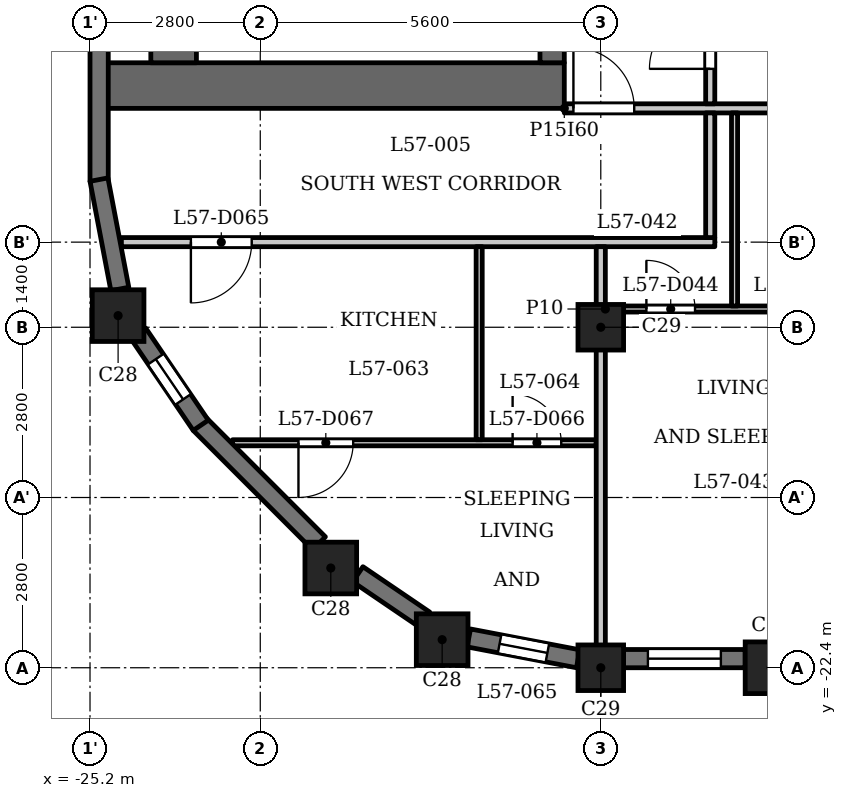
"""IFC4 building model, lengths in metres.
Left out: names, types, materials, properties, quantities, classifications, styles, units other than length and angle.
Written with IfcOpenShell. Run it as: python <this file> out.ifc"""

import sys

from ifc_helpers import new_model, si_unit, direction, frame, frame_2d, origin, origin_2d, place, context, subcontext, project, spatial, rectangle, extrude, element, fill, save


model = new_model("IFC4")
c1 = context("Model", 3, precision=1e-05, world=origin(), true_north=direction((0.0, 1.0)))
c2 = subcontext(c1, "Body", "Model", "MODEL_VIEW")
j1 = project(units=[si_unit("LENGTHUNIT", "METRE"), si_unit("PLANEANGLEUNIT", "RADIAN")], contexts=[c1])
p1 = place(None, origin())
s1 = spatial("IfcSite", under=j1, at=p1, CompositionType="ELEMENT")
p2 = place(p1, origin())
s2 = spatial("IfcBuilding", under=s1, at=p2, CompositionType="ELEMENT")
p3 = place(p2, frame((0.0, 0.0, 220.4)))
s3 = spatial("IfcBuildingStorey", under=s2, at=p3, CompositionType="ELEMENT", Elevation=220.4)
for number, where, z_axis, x_axis in (
    (1, (-19.409, -21.938, 0.0), (0.0, 0.0, 1.0), (1.0, 0.0, 0.0)),
    (2, (-14.0, -22.4, 0.0), (0.0, 0.0, 1.0), (1.0, 0.0, 0.0)),
    (3, (-24.738, -16.609, 0.0), (0.0, 0.0, 1.0), (1.0, 0.0, 0.0)),
    (4, (-21.24, -20.76, 0.0), (0.0, 0.0, 1.0), (1.0, 0.0, 0.0)),
):
    element("IfcColumn", number, at=place(p3, frame(where, z_axis=z_axis, x_axis=x_axis)), inside=s3, PredefinedType="COLUMN", context=c2, shape_type="SweptSolid", body=[
        extrude(rectangle(XDim=0.85, YDim=0.85, at=origin_2d()), origin(), (0.0, 0.0, 1.0), 3.5),
    ])
for number, where, z_axis, x_axis in (
    (5, (-16.8, -22.4, 0.0), (0.0, 0.0, 1.0), (1.0, 0.0, 0.0)),
    (6, (-16.8, -16.8, 0.0), (0.0, 0.0, 1.0), (1.0, 0.0, 0.0)),
):
    element("IfcColumn", number, at=place(p3, frame(where, z_axis=z_axis, x_axis=x_axis)), inside=s3, PredefinedType="COLUMN", context=c2, shape_type="SweptSolid", body=[
        extrude(rectangle(XDim=0.75, YDim=0.75, at=origin_2d()), origin(), (0.0, 0.0, 1.0), 3.5),
    ])
p4 = place(p3, frame((-23.397, -18.391, 0.0), z_axis=(0.0, 0.0, 1.0), x_axis=(0.707106781187, -0.707106781187, 0.0)))
e7 = element("IfcWall", 7, at=p4, inside=s3, PredefinedType="SOLIDWALL", context=c2, shape_type="SweptSolid", body=[
    extrude(rectangle(XDim=2.775, YDim=0.3, at=frame_2d((1.388, 0.0))), origin(), (0.0, 0.0, 1.0), 2.5),
])
p5 = place(p3, frame((-20.796, -20.862, 0.0), z_axis=(0.0, 0.0, 1.0), x_axis=(0.827035970432, -0.562149004813, 0.0)))
e8 = element("IfcWall", 8, at=p5, inside=s3, PredefinedType="SOLIDWALL", context=c2, shape_type="SweptSolid", body=[
    extrude(rectangle(XDim=1.327, YDim=0.3, at=frame_2d((0.664, 0.0))), origin(), (0.0, 0.0, 1.0), 2.5),
])
p6 = place(p3, frame((-18.971, -21.91, 0.0), z_axis=(0.0, 0.0, 1.0), x_axis=(0.982300037503, -0.187314271538, 0.0)))
e9 = element("IfcWall", 9, at=p6, inside=s3, PredefinedType="SOLIDWALL", context=c2, shape_type="SweptSolid", body=[
    extrude(rectangle(XDim=1.831, YDim=0.3, at=frame_2d((0.916, 0.0))), origin(), (0.0, 0.0, 1.0), 2.5),
])
p7 = place(p6, frame((0.516, 0.0, 0.6)))
e10 = element("IfcOpeningElement", 10, at=p7, cuts=e9, PredefinedType="OPENING", context=c2, shape_type="SweptSolid", body=[
    extrude(rectangle(XDim=0.8, YDim=1.55, at=frame_2d((0.4, 0.775))), frame((0.0, 0.16, 0.0), z_axis=(0.0, -1.0, 0.0), x_axis=(1.0, 0.0, 0.0)), (0.0, 0.0, 1.0), 0.32),
])
p8 = place(p3, frame((-16.425, -22.25, 0.0), z_axis=(0.0, 0.0, 1.0), x_axis=(1.0, 0.0, 0.0)))
e11 = element("IfcWall", 11, at=p8, inside=s3, PredefinedType="SOLIDWALL", context=c2, shape_type="SweptSolid", body=[
    extrude(rectangle(XDim=2.0, YDim=0.3, at=frame_2d((1.0, 0.0))), origin(), (0.0, 0.0, 1.0), 2.5),
])
p9 = place(p8, frame((0.4, 0.0, 0.6)))
e12 = element("IfcOpeningElement", 12, at=p9, cuts=e11, PredefinedType="OPENING", context=c2, shape_type="SweptSolid", body=[
    extrude(rectangle(XDim=1.2, YDim=1.55, at=frame_2d((0.6, 0.775))), frame((0.0, 0.16, 0.0), z_axis=(0.0, -1.0, 0.0), x_axis=(1.0, 0.0, 0.0)), (0.0, 0.0, 1.0), 0.32),
])
p10 = place(p3, frame((-25.05, -11.625, 0.0), z_axis=(0.0, 0.0, 1.0), x_axis=(0.0, -1.0, 0.0)))
e13 = element("IfcWall", 13, at=p10, inside=s3, PredefinedType="SOLIDWALL", context=c2, shape_type="SweptSolid", body=[
    extrude(rectangle(XDim=2.775, YDim=0.3, at=frame_2d((1.387, 0.0))), origin(), (0.0, 0.0, 1.0), 2.5),
])
p11 = place(p3, frame((-25.053, -14.372, 0.0), z_axis=(0.0, 0.0, 1.0), x_axis=(0.187442908742, -0.982275499014, 0.0)))
e14 = element("IfcWall", 14, at=p11, inside=s3, PredefinedType="SOLIDWALL", context=c2, shape_type="SweptSolid", body=[
    extrude(rectangle(XDim=1.831, YDim=0.3, at=frame_2d((0.916, 0.0))), origin(), (0.0, 0.0, 1.0), 2.5),
])
p12 = place(p3, frame((-24.408, -16.898, 0.0), z_axis=(0.0, 0.0, 1.0), x_axis=(0.562062033417, -0.827095079535, 0.0)))
e15 = element("IfcWall", 15, at=p12, inside=s3, PredefinedType="SOLIDWALL", context=c2, shape_type="SweptSolid", body=[
    extrude(rectangle(XDim=1.831, YDim=0.3, at=frame_2d((0.916, 0.0))), origin(), (0.0, 0.0, 1.0), 2.5),
])
p13 = place(p12, frame((0.516, 0.0, 0.6)))
e16 = element("IfcOpeningElement", 16, at=p13, cuts=e15, PredefinedType="OPENING", context=c2, shape_type="SweptSolid", body=[
    extrude(rectangle(XDim=0.8, YDim=1.55, at=frame_2d((0.4, 0.775))), frame((0.0, 0.16, 0.0), z_axis=(0.0, -1.0, 0.0), x_axis=(1.0, 0.0, 0.0)), (0.0, 0.0, 1.0), 0.32),
])
p14 = place(p3, frame((-17.4, -12.825, 0.0), z_axis=(0.0, 0.0, 1.0), x_axis=(-1.0, 0.0, 0.0)))
e17 = element("IfcWall", 17, at=p14, inside=s3, PredefinedType="SHEAR", context=c2, shape_type="SweptSolid", body=[
    extrude(rectangle(XDim=7.6, YDim=0.75, at=frame_2d((3.8, 0.0))), origin(), (0.0, 0.0, 1.0), 3.2),
])
p15 = place(p3, frame((-17.6, -12.45, 0.0), z_axis=(0.0, 0.0, 1.0), x_axis=(0.0, 1.0, 0.0)))
e18 = element("IfcWall", 18, at=p15, inside=s3, PredefinedType="SHEAR", context=c2, shape_type="SweptSolid", body=[
    extrude(rectangle(XDim=24.9, YDim=0.4, at=frame_2d((12.45, 0.0))), origin(), (0.0, 0.0, 1.0), 3.2),
])
p16 = place(p15, frame((6.85, 0.0, 0.0)))
e19 = element("IfcOpeningElement", 19, at=p16, cuts=e18, PredefinedType="OPENING", context=c2, shape_type="SweptSolid", body=[
    extrude(rectangle(XDim=0.9, YDim=2.1, at=frame_2d((0.45, 1.05))), frame((0.0, 0.21, 0.0), z_axis=(0.0, -1.0, 0.0), x_axis=(1.0, 0.0, 0.0)), (0.0, 0.0, 1.0), 0.42),
])
p17 = place(p15, frame((10.45, 0.0, 0.0)))
e20 = element("IfcOpeningElement", 20, at=p17, cuts=e18, PredefinedType="OPENING", context=c2, shape_type="SweptSolid", body=[
    extrude(rectangle(XDim=0.9, YDim=2.1, at=frame_2d((0.45, 1.05))), frame((0.0, 0.21, 0.0), z_axis=(0.0, -1.0, 0.0), x_axis=(1.0, 0.0, 0.0)), (0.0, 0.0, 1.0), 0.42),
])
p18 = place(p15, frame((15.6, 0.0, 0.0)))
e21 = element("IfcOpeningElement", 21, at=p18, cuts=e18, PredefinedType="OPENING", context=c2, shape_type="SweptSolid", body=[
    extrude(rectangle(XDim=1.1, YDim=2.1, at=frame_2d((0.55, 1.05))), frame((0.0, 0.21, 0.0), z_axis=(0.0, -1.0, 0.0), x_axis=(1.0, 0.0, 0.0)), (0.0, 0.0, 1.0), 0.42),
])
p19 = place(p15, frame((18.0, 0.0, 0.0)))
e22 = element("IfcOpeningElement", 22, at=p19, cuts=e18, PredefinedType="OPENING", context=c2, shape_type="SweptSolid", body=[
    extrude(rectangle(XDim=1.1, YDim=2.1, at=frame_2d((0.55, 1.05))), frame((0.0, 0.21, 0.0), z_axis=(0.0, -1.0, 0.0), x_axis=(1.0, 0.0, 0.0)), (0.0, 0.0, 1.0), 0.42),
])
p20 = place(p15, frame((23.025, 0.0, 0.0)))
e23 = element("IfcOpeningElement", 23, at=p20, cuts=e18, PredefinedType="OPENING", context=c2, shape_type="SweptSolid", body=[
    extrude(rectangle(XDim=1.1, YDim=2.1, at=frame_2d((0.55, 1.05))), frame((0.0, 0.21, 0.0), z_axis=(0.0, -1.0, 0.0), x_axis=(1.0, 0.0, 0.0)), (0.0, 0.0, 1.0), 0.42),
])
p21 = place(p15, frame((0.775, 0.0, 0.0)))
e24 = element("IfcOpeningElement", 24, at=p21, cuts=e18, PredefinedType="OPENING", context=c2, shape_type="SweptSolid", body=[
    extrude(rectangle(XDim=1.1, YDim=2.1, at=frame_2d((0.55, 1.05))), frame((0.0, 0.21, 0.0), z_axis=(0.0, -1.0, 0.0), x_axis=(1.0, 0.0, 0.0)), (0.0, 0.0, 1.0), 0.42),
])
p22 = place(p15, frame((12.925, 0.0, 0.0)))
e25 = element("IfcOpeningElement", 25, at=p22, cuts=e18, PredefinedType="OPENING", context=c2, shape_type="SweptSolid", body=[
    extrude(rectangle(XDim=1.8, YDim=2.1, at=frame_2d((0.9, 1.05))), frame((0.0, 0.21, 0.0), z_axis=(0.0, -1.0, 0.0), x_axis=(1.0, 0.0, 0.0)), (0.0, 0.0, 1.0), 0.42),
])
p23 = place(p3, frame((-23.825, -12.45, 0.0), z_axis=(0.0, 0.0, 1.0), x_axis=(0.0, 1.0, 0.0)))
e26 = element("IfcWall", 26, at=p23, inside=s3, PredefinedType="SHEAR", context=c2, shape_type="SweptSolid", body=[
    extrude(rectangle(XDim=24.9, YDim=0.75, at=frame_2d((12.45, 0.0))), origin(), (0.0, 0.0, 1.0), 3.2),
])
p24 = place(p3, frame((-22.856, -18.7, 0.0), z_axis=(0.0, 0.0, 1.0), x_axis=(1.0, 0.0, 0.0)))
e27 = element("IfcWall", 27, at=p24, inside=s3, PredefinedType="PARTITIONING", context=c2, shape_type="SweptSolid", body=[
    extrude(rectangle(XDim=5.981, YDim=0.1, at=frame_2d((2.99, 0.0))), origin(), (0.0, 0.0, 1.0), 3.2),
])
p25 = place(p24, frame((4.606, 0.0, 0.0)))
e28 = element("IfcOpeningElement", 28, at=p25, cuts=e27, PredefinedType="OPENING", context=c2, shape_type="SweptSolid", body=[
    extrude(rectangle(XDim=0.8, YDim=2.1, at=frame_2d((0.4, 1.05))), frame((0.0, 0.06, 0.0), z_axis=(0.0, -1.0, 0.0), x_axis=(1.0, 0.0, 0.0)), (0.0, 0.0, 1.0), 0.12),
])
p26 = place(p24, frame((1.084, 0.0, 0.0)))
e29 = element("IfcOpeningElement", 29, at=p26, cuts=e27, PredefinedType="OPENING", context=c2, shape_type="SweptSolid", body=[
    extrude(rectangle(XDim=0.9, YDim=2.1, at=frame_2d((0.45, 1.05))), frame((0.0, 0.06, 0.0), z_axis=(0.0, -1.0, 0.0), x_axis=(1.0, 0.0, 0.0)), (0.0, 0.0, 1.0), 0.12),
])
p27 = place(p3, frame((-16.725, -16.5, 0.0), z_axis=(0.0, 0.0, 1.0), x_axis=(1.0, 0.0, 0.0)))
e30 = element("IfcWall", 30, at=p27, inside=s3, PredefinedType="PARTITIONING", context=c2, shape_type="SweptSolid", body=[
    extrude(rectangle(XDim=33.45, YDim=0.1, at=frame_2d((16.725, 0.0))), origin(), (0.0, 0.0, 1.0), 3.2),
])
p28 = place(p27, frame((0.675, 0.0, 0.0)))
e31 = element("IfcOpeningElement", 31, at=p28, cuts=e30, PredefinedType="OPENING", context=c2, shape_type="SweptSolid", body=[
    extrude(rectangle(XDim=0.8, YDim=2.1, at=frame_2d((0.4, 1.05))), frame((0.0, 0.06, 0.0), z_axis=(0.0, -1.0, 0.0), x_axis=(1.0, 0.0, 0.0)), (0.0, 0.0, 1.0), 0.12),
])
p29 = place(p27, frame((2.775, 0.0, 0.0)))
e32 = element("IfcOpeningElement", 32, at=p29, cuts=e30, PredefinedType="OPENING", context=c2, shape_type="SweptSolid", body=[
    extrude(rectangle(XDim=0.9, YDim=2.1, at=frame_2d((0.45, 1.05))), frame((0.0, 0.06, 0.0), z_axis=(0.0, -1.0, 0.0), x_axis=(1.0, 0.0, 0.0)), (0.0, 0.0, 1.0), 0.12),
])
p30 = place(p27, frame((6.425, 0.0, 0.0)))
e33 = element("IfcOpeningElement", 33, at=p30, cuts=e30, PredefinedType="OPENING", context=c2, shape_type="SweptSolid", body=[
    extrude(rectangle(XDim=0.8, YDim=2.1, at=frame_2d((0.4, 1.05))), frame((0.0, 0.06, 0.0), z_axis=(0.0, -1.0, 0.0), x_axis=(1.0, 0.0, 0.0)), (0.0, 0.0, 1.0), 0.12),
])
p31 = place(p27, frame((8.775, 0.0, 0.0)))
e34 = element("IfcOpeningElement", 34, at=p31, cuts=e30, PredefinedType="OPENING", context=c2, shape_type="SweptSolid", body=[
    extrude(rectangle(XDim=0.9, YDim=2.1, at=frame_2d((0.45, 1.05))), frame((0.0, 0.06, 0.0), z_axis=(0.0, -1.0, 0.0), x_axis=(1.0, 0.0, 0.0)), (0.0, 0.0, 1.0), 0.12),
])
p32 = place(p27, frame((12.525, 0.0, 0.0)))
e35 = element("IfcOpeningElement", 35, at=p32, cuts=e30, PredefinedType="OPENING", context=c2, shape_type="SweptSolid", body=[
    extrude(rectangle(XDim=0.9, YDim=2.1, at=frame_2d((0.45, 1.05))), frame((0.0, 0.06, 0.0), z_axis=(0.0, -1.0, 0.0), x_axis=(1.0, 0.0, 0.0)), (0.0, 0.0, 1.0), 0.12),
])
p33 = place(p27, frame((14.775, 0.0, 0.0)))
e36 = element("IfcOpeningElement", 36, at=p33, cuts=e30, PredefinedType="OPENING", context=c2, shape_type="SweptSolid", body=[
    extrude(rectangle(XDim=0.9, YDim=2.1, at=frame_2d((0.45, 1.05))), frame((0.0, 0.06, 0.0), z_axis=(0.0, -1.0, 0.0), x_axis=(1.0, 0.0, 0.0)), (0.0, 0.0, 1.0), 0.12),
])
p34 = place(p27, frame((25.475, 0.0, 0.0)))
e37 = element("IfcOpeningElement", 37, at=p34, cuts=e30, PredefinedType="OPENING", context=c2, shape_type="SweptSolid", body=[
    extrude(rectangle(XDim=0.8, YDim=2.1, at=frame_2d((0.4, 1.05))), frame((0.0, 0.06, 0.0), z_axis=(0.0, -1.0, 0.0), x_axis=(1.0, 0.0, 0.0)), (0.0, 0.0, 1.0), 0.12),
])
p35 = place(p27, frame((23.225, 0.0, 0.0)))
e38 = element("IfcOpeningElement", 38, at=p35, cuts=e30, PredefinedType="OPENING", context=c2, shape_type="SweptSolid", body=[
    extrude(rectangle(XDim=0.9, YDim=2.1, at=frame_2d((0.45, 1.05))), frame((0.0, 0.06, 0.0), z_axis=(0.0, -1.0, 0.0), x_axis=(1.0, 0.0, 0.0)), (0.0, 0.0, 1.0), 0.12),
])
p36 = place(p27, frame((17.875, 0.0, 0.0)))
e39 = element("IfcOpeningElement", 39, at=p36, cuts=e30, PredefinedType="OPENING", context=c2, shape_type="SweptSolid", body=[
    extrude(rectangle(XDim=0.9, YDim=2.1, at=frame_2d((0.45, 1.05))), frame((0.0, 0.06, 0.0), z_axis=(0.0, -1.0, 0.0), x_axis=(1.0, 0.0, 0.0)), (0.0, 0.0, 1.0), 0.12),
])
p37 = place(p27, frame((19.975, 0.0, 0.0)))
e40 = element("IfcOpeningElement", 40, at=p37, cuts=e30, PredefinedType="OPENING", context=c2, shape_type="SweptSolid", body=[
    extrude(rectangle(XDim=0.9, YDim=2.1, at=frame_2d((0.45, 1.05))), frame((0.0, 0.06, 0.0), z_axis=(0.0, -1.0, 0.0), x_axis=(1.0, 0.0, 0.0)), (0.0, 0.0, 1.0), 0.12),
])
p38 = place(p27, frame((30.825, 0.0, 0.0)))
e41 = element("IfcOpeningElement", 41, at=p38, cuts=e30, PredefinedType="OPENING", context=c2, shape_type="SweptSolid", body=[
    extrude(rectangle(XDim=0.8, YDim=2.1, at=frame_2d((0.4, 1.05))), frame((0.0, 0.06, 0.0), z_axis=(0.0, -1.0, 0.0), x_axis=(1.0, 0.0, 0.0)), (0.0, 0.0, 1.0), 0.12),
])
p39 = place(p27, frame((29.075, 0.0, 0.0)))
e42 = element("IfcOpeningElement", 42, at=p39, cuts=e30, PredefinedType="OPENING", context=c2, shape_type="SweptSolid", body=[
    extrude(rectangle(XDim=0.9, YDim=2.1, at=frame_2d((0.45, 1.05))), frame((0.0, 0.06, 0.0), z_axis=(0.0, -1.0, 0.0), x_axis=(1.0, 0.0, 0.0)), (0.0, 0.0, 1.0), 0.12),
])
p40 = place(p3, frame((-24.684, -15.4, 0.0), z_axis=(0.0, 0.0, 1.0), x_axis=(1.0, 0.0, 0.0)))
e43 = element("IfcWall", 43, at=p40, inside=s3, PredefinedType="PARTITIONING", context=c2, shape_type="SweptSolid", body=[
    extrude(rectangle(XDim=9.759, YDim=0.15, at=frame_2d((4.879, 0.0))), origin(), (0.0, 0.0, 1.0), 3.2),
])
p41 = place(p40, frame((1.143, 0.0, 0.0)))
e44 = element("IfcOpeningElement", 44, at=p41, cuts=e43, PredefinedType="OPENING", context=c2, shape_type="SweptSolid", body=[
    extrude(rectangle(XDim=1.0, YDim=2.1, at=frame_2d((0.5, 1.05))), frame((0.0, 0.085, 0.0), z_axis=(0.0, -1.0, 0.0), x_axis=(1.0, 0.0, 0.0)), (0.0, 0.0, 1.0), 0.17),
])
p42 = place(p3, frame((-17.4, -13.2, 0.0), z_axis=(0.0, 0.0, 1.0), x_axis=(1.0, 0.0, 0.0)))
e45 = element("IfcWall", 45, at=p42, inside=s3, PredefinedType="PARTITIONING", context=c2, shape_type="SweptSolid", body=[
    extrude(rectangle(XDim=34.8, YDim=0.15, at=frame_2d((17.4, 0.0))), origin(), (0.0, 0.0, 1.0), 3.2),
])
p43 = place(p42, frame((0.15, 0.0, 0.0)))
e46 = element("IfcOpeningElement", 46, at=p43, cuts=e45, PredefinedType="OPENING", context=c2, shape_type="SweptSolid", body=[
    extrude(rectangle(XDim=1.0, YDim=2.1, at=frame_2d((0.5, 1.05))), frame((0.0, 0.085, 0.0), z_axis=(0.0, -1.0, 0.0), x_axis=(1.0, 0.0, 0.0)), (0.0, 0.0, 1.0), 0.17),
])
p44 = place(p42, frame((33.55, 0.0, 0.0)))
e47 = element("IfcOpeningElement", 47, at=p44, cuts=e45, PredefinedType="OPENING", context=c2, shape_type="SweptSolid", body=[
    extrude(rectangle(XDim=1.0, YDim=2.1, at=frame_2d((0.5, 1.05))), frame((0.0, 0.085, 0.0), z_axis=(0.0, -1.0, 0.0), x_axis=(1.0, 0.0, 0.0)), (0.0, 0.0, 1.0), 0.17),
])
p45 = place(p42, frame((3.7, 0.0, 0.0)))
e48 = element("IfcOpeningElement", 48, at=p45, cuts=e45, PredefinedType="OPENING", context=c2, shape_type="SweptSolid", body=[
    extrude(rectangle(XDim=1.0, YDim=2.1, at=frame_2d((0.5, 1.05))), frame((0.0, 0.085, 0.0), z_axis=(0.0, -1.0, 0.0), x_axis=(1.0, 0.0, 0.0)), (0.0, 0.0, 1.0), 0.17),
])
p46 = place(p42, frame((15.7, 0.0, 0.0)))
e49 = element("IfcOpeningElement", 49, at=p46, cuts=e45, PredefinedType="OPENING", context=c2, shape_type="SweptSolid", body=[
    extrude(rectangle(XDim=1.0, YDim=2.1, at=frame_2d((0.5, 1.05))), frame((0.0, 0.085, 0.0), z_axis=(0.0, -1.0, 0.0), x_axis=(1.0, 0.0, 0.0)), (0.0, 0.0, 1.0), 0.17),
])
p47 = place(p42, frame((21.3, 0.0, 0.0)))
e50 = element("IfcOpeningElement", 50, at=p47, cuts=e45, PredefinedType="OPENING", context=c2, shape_type="SweptSolid", body=[
    extrude(rectangle(XDim=1.0, YDim=2.1, at=frame_2d((0.5, 1.05))), frame((0.0, 0.085, 0.0), z_axis=(0.0, -1.0, 0.0), x_axis=(1.0, 0.0, 0.0)), (0.0, 0.0, 1.0), 0.17),
])
p48 = place(p42, frame((29.5, 0.0, 0.0)))
e51 = element("IfcOpeningElement", 51, at=p48, cuts=e45, PredefinedType="OPENING", context=c2, shape_type="SweptSolid", body=[
    extrude(rectangle(XDim=1.0, YDim=2.1, at=frame_2d((0.5, 1.05))), frame((0.0, 0.085, 0.0), z_axis=(0.0, -1.0, 0.0), x_axis=(1.0, 0.0, 0.0)), (0.0, 0.0, 1.0), 0.17),
])
p49 = place(p3, frame((-18.8, -18.65, 0.0), z_axis=(0.0, 0.0, 1.0), x_axis=(0.0, 1.0, 0.0)))
e52 = element("IfcWall", 52, at=p49, inside=s3, PredefinedType="PARTITIONING", context=c2, shape_type="SweptSolid", body=[
    extrude(rectangle(XDim=3.175, YDim=0.1, at=frame_2d((1.587, 0.0))), origin(), (0.0, 0.0, 1.0), 3.2),
])
p50 = place(p3, frame((-16.8, -22.31, 0.0), z_axis=(0.0, 0.0, 1.0), x_axis=(0.0, 1.0, 0.0)))
e53 = element("IfcWall", 53, at=p50, inside=s3, PredefinedType="PARTITIONING", context=c2, shape_type="SweptSolid", body=[
    extrude(rectangle(XDim=6.835, YDim=0.15, at=frame_2d((3.417, 0.0))), origin(), (0.0, 0.0, 1.0), 2.55),
])
p51 = place(p3, frame((-15.0, -15.325, 0.0), z_axis=(0.0, 0.0, 1.0), x_axis=(0.0, 1.0, 0.0)))
e54 = element("IfcWall", 54, at=p51, inside=s3, PredefinedType="PARTITIONING", context=c2, shape_type="SweptSolid", body=[
    extrude(rectangle(XDim=2.05, YDim=0.15, at=frame_2d((1.025, 0.0))), origin(), (0.0, 0.0, 1.0), 3.2),
])
p52 = place(p3, frame((-15.0, -13.125, 0.0), z_axis=(0.0, 0.0, 1.0), x_axis=(0.0, 1.0, 0.0)))
e55 = element("IfcWall", 55, at=p52, inside=s3, PredefinedType="PARTITIONING", context=c2, shape_type="SweptSolid", body=[
    extrude(rectangle(XDim=6.356, YDim=0.15, at=frame_2d((3.178, 0.0))), origin(), (0.0, 0.0, 1.0), 3.2),
])
p53 = place(p52, frame((0.575, 0.0, 0.0)))
e56 = element("IfcOpeningElement", 56, at=p53, cuts=e55, PredefinedType="OPENING", context=c2, shape_type="SweptSolid", body=[
    extrude(rectangle(XDim=1.0, YDim=2.1, at=frame_2d((0.5, 1.05))), frame((0.0, 0.085, 0.0), z_axis=(0.0, -1.0, 0.0), x_axis=(1.0, 0.0, 0.0)), (0.0, 0.0, 1.0), 0.17),
])
p54 = place(p3, frame((-14.6, -16.45, 0.0), z_axis=(0.0, 0.0, 1.0), x_axis=(0.0, 1.0, 0.0)))
e57 = element("IfcWall", 57, at=p54, inside=s3, PredefinedType="PARTITIONING", context=c2, shape_type="SweptSolid", body=[
    extrude(rectangle(XDim=3.175, YDim=0.1, at=frame_2d((1.587, 0.0))), origin(), (0.0, 0.0, 1.0), 3.2),
])
p55 = place(p53, origin())
e58 = element("IfcDoor", 58, at=p55, inside=s3, OperationType="SINGLE_SWING_RIGHT", PredefinedType="DOOR", context=c2, shape_type="SweptSolid", body=[
    extrude(rectangle(XDim=1.0, YDim=2.1, at=frame_2d((0.5, 1.05))), frame((0.0, 0.025, 0.0), z_axis=(0.0, -1.0, 0.0), x_axis=(1.0, 0.0, 0.0)), (0.0, 0.0, 1.0), 0.05),
])
fill(e56, e58)
p56 = place(p43, origin())
e59 = element("IfcDoor", 59, at=p56, inside=s3, OperationType="SINGLE_SWING_RIGHT", PredefinedType="DOOR", context=c2, shape_type="SweptSolid", body=[
    extrude(rectangle(XDim=1.0, YDim=2.1, at=frame_2d((0.5, 1.05))), frame((0.0, 0.025, 0.0), z_axis=(0.0, -1.0, 0.0), x_axis=(1.0, 0.0, 0.0)), (0.0, 0.0, 1.0), 0.05),
])
fill(e46, e59)
p57 = place(p28, origin())
e60 = element("IfcDoor", 60, at=p57, inside=s3, OperationType="SINGLE_SWING_RIGHT", PredefinedType="DOOR", context=c2, shape_type="SweptSolid", body=[
    extrude(rectangle(XDim=0.8, YDim=2.1, at=frame_2d((0.4, 1.05))), frame((0.0, 0.025, 0.0), z_axis=(0.0, -1.0, 0.0), x_axis=(1.0, 0.0, 0.0)), (0.0, 0.0, 1.0), 0.05),
])
fill(e31, e60)
p58 = place(p41, origin())
e61 = element("IfcDoor", 61, at=p58, inside=s3, OperationType="SINGLE_SWING_LEFT", PredefinedType="DOOR", context=c2, shape_type="SweptSolid", body=[
    extrude(rectangle(XDim=1.0, YDim=2.1, at=frame_2d((0.5, 1.05))), frame((0.0, 0.025, 0.0), z_axis=(0.0, -1.0, 0.0), x_axis=(1.0, 0.0, 0.0)), (0.0, 0.0, 1.0), 0.05),
])
fill(e44, e61)
p59 = place(p25, origin())
e62 = element("IfcDoor", 62, at=p59, inside=s3, OperationType="SINGLE_SWING_RIGHT", PredefinedType="DOOR", context=c2, shape_type="SweptSolid", body=[
    extrude(rectangle(XDim=0.8, YDim=2.1, at=frame_2d((0.4, 1.05))), frame((0.0, 0.025, 0.0), z_axis=(0.0, -1.0, 0.0), x_axis=(1.0, 0.0, 0.0)), (0.0, 0.0, 1.0), 0.05),
])
fill(e28, e62)
p60 = place(p26, origin())
e63 = element("IfcDoor", 63, at=p60, inside=s3, OperationType="SINGLE_SWING_LEFT", PredefinedType="DOOR", context=c2, shape_type="SweptSolid", body=[
    extrude(rectangle(XDim=0.9, YDim=2.1, at=frame_2d((0.45, 1.05))), frame((0.0, 0.025, 0.0), z_axis=(0.0, -1.0, 0.0), x_axis=(1.0, 0.0, 0.0)), (0.0, 0.0, 1.0), 0.05),
])
fill(e29, e63)
p61 = place(p7, origin())
e64 = element("IfcWindow", 64, at=p61, inside=s3, PartitioningType="SINGLE_PANEL", PredefinedType="WINDOW", context=c2, shape_type="SweptSolid", body=[
    extrude(rectangle(XDim=0.8, YDim=1.55, at=frame_2d((0.4, 0.775))), frame((0.0, 0.03, 0.0), z_axis=(0.0, -1.0, 0.0), x_axis=(1.0, 0.0, 0.0)), (0.0, 0.0, 1.0), 0.06),
])
fill(e10, e64)
p62 = place(p9, origin())
e65 = element("IfcWindow", 65, at=p62, inside=s3, PartitioningType="SINGLE_PANEL", PredefinedType="WINDOW", context=c2, shape_type="SweptSolid", body=[
    extrude(rectangle(XDim=1.2, YDim=1.55, at=frame_2d((0.6, 0.775))), frame((0.0, 0.03, 0.0), z_axis=(0.0, -1.0, 0.0), x_axis=(1.0, 0.0, 0.0)), (0.0, 0.0, 1.0), 0.06),
])
fill(e12, e65)
p63 = place(p13, origin())
e66 = element("IfcWindow", 66, at=p63, inside=s3, PartitioningType="SINGLE_PANEL", PredefinedType="WINDOW", context=c2, shape_type="SweptSolid", body=[
    extrude(rectangle(XDim=0.8, YDim=1.55, at=frame_2d((0.4, 0.775))), frame((0.0, 0.03, 0.0), z_axis=(0.0, -1.0, 0.0), x_axis=(1.0, 0.0, 0.0)), (0.0, 0.0, 1.0), 0.06),
])
fill(e16, e66)
save(model, sys.argv[1])
